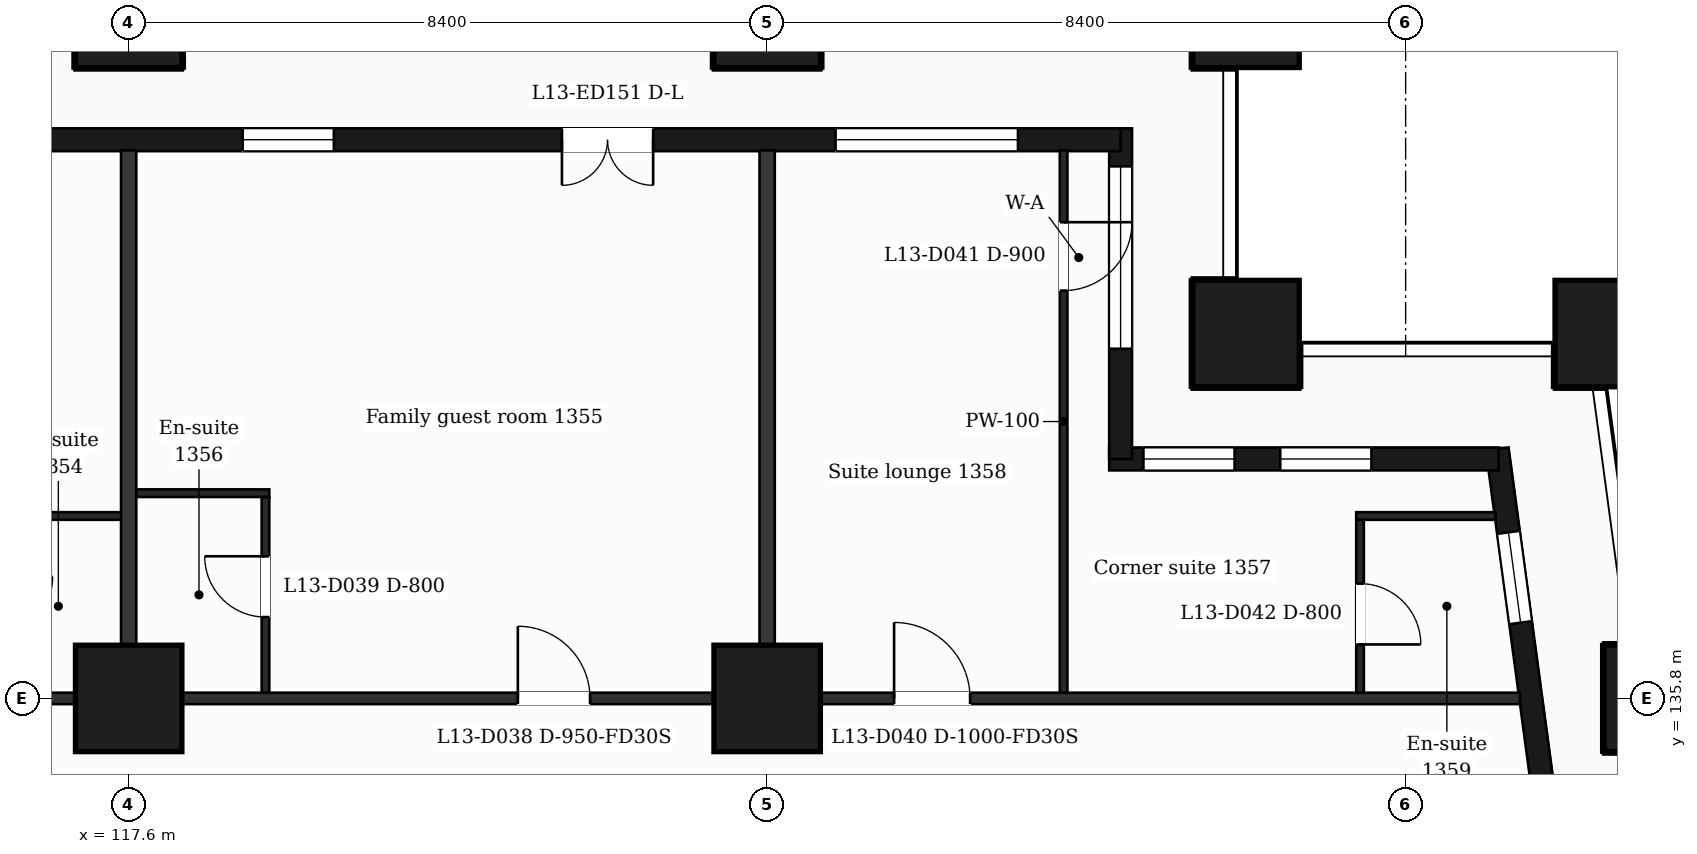
"""IFC4 building model, lengths in metres.
Left out: names, types, materials, properties, quantities, classifications, styles, units other than length and angle.
Written with IfcOpenShell. Run it as: python <this file> out.ifc"""

import sys

from ifc_helpers import new_model, si_unit, direction, frame, frame_2d, origin, origin_2d, place, context, subcontext, project, spatial, rectangle, extrude, element, fill, save


model = new_model("IFC4")
c1 = context("Model", 3, precision=1e-05, world=origin(), true_north=direction((0.0, 1.0)))
c2 = subcontext(c1, "Body", "Model", "MODEL_VIEW")
j1 = project(units=[si_unit("LENGTHUNIT", "METRE"), si_unit("PLANEANGLEUNIT", "RADIAN")], contexts=[c1])
p1 = place(None, origin())
s1 = spatial("IfcSite", under=j1, at=p1, CompositionType="ELEMENT")
p2 = place(p1, origin())
s2 = spatial("IfcBuilding", under=s1, at=p2, CompositionType="ELEMENT")
p3 = place(p2, frame((0.0, 0.0, 63.5)))
s3 = spatial("IfcBuildingStorey", under=s2, at=p3, CompositionType="ELEMENT", Elevation=63.5)
for number, where, z_axis, x_axis in (
    (1, (132.3, 140.6, 0.0), (0.0, 0.0, 1.0), (1.0, 0.0, 0.0)),
    (2, (137.065, 140.6, 0.0), (0.0, 0.0, 1.0), (1.0, 0.0, 0.0)),
    (3, (117.6, 135.8, 0.0), (0.0, 0.0, 1.0), (1.0, 0.0, 0.0)),
    (4, (126.0, 135.8, 0.0), (0.0, 0.0, 1.0), (1.0, 0.0, 0.0)),
    (5, (137.711, 135.8, 0.0), (0.0, 0.0, 1.0), (1.0, 0.0, 0.0)),
    (6, (117.6, 144.8, 0.0), (0.0, 0.0, 1.0), (1.0, 0.0, 0.0)),
    (7, (126.0, 144.8, 0.0), (0.0, 0.0, 1.0), (1.0, 0.0, 0.0)),
    (8, (132.3, 144.8, 0.0), (0.0, 0.0, 1.0), (1.0, 0.0, 0.0)),
):
    element("IfcColumn", number, at=place(p3, frame(where, z_axis=z_axis, x_axis=x_axis)), inside=s3, PredefinedType="COLUMN", context=c2, shape_type="SweptSolid", body=[
        extrude(rectangle(XDim=1.4, YDim=1.4, at=origin_2d()), origin(), (0.0, 0.0, 1.0), 3.5),
    ])
p4 = place(p3, frame((136.504, 132.4, 0.0), z_axis=(0.0, 0.0, 1.0), x_axis=(-0.133399697462, 0.99106231929, 0.0)))
e9 = element("IfcWall", 9, at=p4, inside=s3, PredefinedType="SOLIDWALL", context=c2, shape_type="SweptSolid", body=[
    extrude(rectangle(XDim=6.74, YDim=0.3, at=frame_2d((3.37, 0.0))), origin(), (0.0, 0.0, 1.0), 3.18),
])
p5 = place(p4, frame((1.115, 0.0, 0.0)))
e10 = element("IfcOpeningElement", 10, at=p5, cuts=e9, PredefinedType="OPENING", context=c2, shape_type="SweptSolid", body=[
    extrude(rectangle(XDim=1.2, YDim=2.4, at=frame_2d((0.6, 1.2))), frame((0.0, 0.16, 0.0), z_axis=(0.0, -1.0, 0.0), x_axis=(1.0, 0.0, 0.0)), (0.0, 0.0, 1.0), 0.32),
])
p6 = place(p4, frame((4.436, 0.0, 0.9)))
e11 = element("IfcOpeningElement", 11, at=p6, cuts=e9, PredefinedType="OPENING", context=c2, shape_type="SweptSolid", body=[
    extrude(rectangle(XDim=1.2, YDim=2.1, at=frame_2d((0.6, 1.05))), frame((0.0, 0.16, 0.0), z_axis=(0.0, -1.0, 0.0), x_axis=(1.0, 0.0, 0.0)), (0.0, 0.0, 1.0), 0.32),
])
p7 = place(p3, frame((135.623, 138.95, 0.0), z_axis=(0.0, 0.0, 1.0), x_axis=(-1.0, 0.0, 0.0)))
e12 = element("IfcWall", 12, at=p7, inside=s3, PredefinedType="SOLIDWALL", context=c2, shape_type="SweptSolid", body=[
    extrude(rectangle(XDim=5.123, YDim=0.3, at=frame_2d((2.561, 0.0))), origin(), (0.0, 0.0, 1.0), 3.18),
])
p8 = place(p7, frame((1.673, 0.0, 0.9)))
e13 = element("IfcOpeningElement", 13, at=p8, cuts=e12, PredefinedType="OPENING", context=c2, shape_type="SweptSolid", body=[
    extrude(rectangle(XDim=1.2, YDim=2.1, at=frame_2d((0.6, 1.05))), frame((0.0, 0.16, 0.0), z_axis=(0.0, -1.0, 0.0), x_axis=(1.0, 0.0, 0.0)), (0.0, 0.0, 1.0), 0.32),
])
p9 = place(p7, frame((3.473, 0.0, 0.9)))
e14 = element("IfcOpeningElement", 14, at=p9, cuts=e12, PredefinedType="OPENING", context=c2, shape_type="SweptSolid", body=[
    extrude(rectangle(XDim=1.2, YDim=2.1, at=frame_2d((0.6, 1.05))), frame((0.0, 0.16, 0.0), z_axis=(0.0, -1.0, 0.0), x_axis=(1.0, 0.0, 0.0)), (0.0, 0.0, 1.0), 0.32),
])
p10 = place(p3, frame((130.65, 138.95, 0.0), z_axis=(0.0, 0.0, 1.0), x_axis=(0.0, 1.0, 0.0)))
e15 = element("IfcWall", 15, at=p10, inside=s3, PredefinedType="SOLIDWALL", context=c2, shape_type="SweptSolid", body=[
    extrude(rectangle(XDim=4.35, YDim=0.3, at=frame_2d((2.175, 0.0))), origin(), (0.0, 0.0, 1.0), 3.18),
])
p11 = place(p10, frame((1.45, 0.0, 0.9)))
e16 = element("IfcOpeningElement", 16, at=p11, cuts=e15, PredefinedType="OPENING", context=c2, shape_type="SweptSolid", body=[
    extrude(rectangle(XDim=2.4, YDim=2.1, at=frame_2d((1.2, 1.05))), frame((0.0, 0.16, 0.0), z_axis=(0.0, -1.0, 0.0), x_axis=(1.0, 0.0, 0.0)), (0.0, 0.0, 1.0), 0.32),
])
p12 = place(p3, frame((130.65, 143.15, 0.0), z_axis=(0.0, 0.0, 1.0), x_axis=(-1.0, 0.0, 0.0)))
e17 = element("IfcWall", 17, at=p12, inside=s3, PredefinedType="SOLIDWALL", context=c2, shape_type="SweptSolid", body=[
    extrude(rectangle(XDim=14.25, YDim=0.3, at=frame_2d((7.125, 0.0))), origin(), (0.0, 0.0, 1.0), 3.18),
])
p13 = place(p12, frame((1.35, 0.0, 0.9)))
e18 = element("IfcOpeningElement", 18, at=p13, cuts=e17, PredefinedType="OPENING", context=c2, shape_type="SweptSolid", body=[
    extrude(rectangle(XDim=2.4, YDim=2.1, at=frame_2d((1.2, 1.05))), frame((0.0, 0.16, 0.0), z_axis=(0.0, -1.0, 0.0), x_axis=(1.0, 0.0, 0.0)), (0.0, 0.0, 1.0), 0.32),
])
p14 = place(p12, frame((6.15, 0.0, 0.0)))
e19 = element("IfcOpeningElement", 19, at=p14, cuts=e17, PredefinedType="OPENING", context=c2, shape_type="SweptSolid", body=[
    extrude(rectangle(XDim=1.2, YDim=2.4, at=frame_2d((0.6, 1.2))), frame((0.0, 0.16, 0.0), z_axis=(0.0, -1.0, 0.0), x_axis=(1.0, 0.0, 0.0)), (0.0, 0.0, 1.0), 0.32),
])
p15 = place(p12, frame((10.35, 0.0, 0.9)))
e20 = element("IfcOpeningElement", 20, at=p15, cuts=e17, PredefinedType="OPENING", context=c2, shape_type="SweptSolid", body=[
    extrude(rectangle(XDim=1.2, YDim=2.1, at=frame_2d((0.6, 1.05))), frame((0.0, 0.16, 0.0), z_axis=(0.0, -1.0, 0.0), x_axis=(1.0, 0.0, 0.0)), (0.0, 0.0, 1.0), 0.32),
])
p16 = place(p3, frame((90.895, 135.8, 0.0), z_axis=(0.0, 0.0, 1.0), x_axis=(1.0, 0.0, 0.0)))
e21 = element("IfcWall", 21, at=p16, inside=s3, PredefinedType="PARTITIONING", context=c2, shape_type="SweptSolid", body=[
    extrude(rectangle(XDim=45.011, YDim=0.15, at=frame_2d((22.505, 0.0))), origin(), (0.0, 0.0, 1.0), 3.18),
])
p17 = place(p16, frame((7.675, 0.0, 0.0)))
e22 = element("IfcOpeningElement", 22, at=p17, cuts=e21, PredefinedType="OPENING", context=c2, shape_type="SweptSolid", body=[
    extrude(rectangle(XDim=1.0, YDim=2.1, at=frame_2d((0.5, 1.05))), frame((0.0, 0.085, 0.0), z_axis=(0.0, -1.0, 0.0), x_axis=(1.0, 0.0, 0.0)), (0.0, 0.0, 1.0), 0.17),
])
p18 = place(p16, frame((10.892, 0.0, 0.0)))
e23 = element("IfcOpeningElement", 23, at=p18, cuts=e21, PredefinedType="OPENING", context=c2, shape_type="SweptSolid", body=[
    extrude(rectangle(XDim=0.95, YDim=2.1, at=frame_2d((0.475, 1.05))), frame((0.0, 0.085, 0.0), z_axis=(0.0, -1.0, 0.0), x_axis=(1.0, 0.0, 0.0)), (0.0, 0.0, 1.0), 0.17),
])
p19 = place(p16, frame((16.442, 0.0, 0.0)))
e24 = element("IfcOpeningElement", 24, at=p19, cuts=e21, PredefinedType="OPENING", context=c2, shape_type="SweptSolid", body=[
    extrude(rectangle(XDim=0.95, YDim=2.1, at=frame_2d((0.475, 1.05))), frame((0.0, 0.085, 0.0), z_axis=(0.0, -1.0, 0.0), x_axis=(1.0, 0.0, 0.0)), (0.0, 0.0, 1.0), 0.17),
])
p20 = place(p16, frame((22.368, 0.0, 0.0)))
e25 = element("IfcOpeningElement", 25, at=p20, cuts=e21, PredefinedType="OPENING", context=c2, shape_type="SweptSolid", body=[
    extrude(rectangle(XDim=0.95, YDim=2.1, at=frame_2d((0.475, 1.05))), frame((0.0, 0.085, 0.0), z_axis=(0.0, -1.0, 0.0), x_axis=(1.0, 0.0, 0.0)), (0.0, 0.0, 1.0), 0.17),
])
p21 = place(p16, frame((31.825, 0.0, 0.0)))
e26 = element("IfcOpeningElement", 26, at=p21, cuts=e21, PredefinedType="OPENING", context=c2, shape_type="SweptSolid", body=[
    extrude(rectangle(XDim=0.95, YDim=2.1, at=frame_2d((0.475, 1.05))), frame((0.0, 0.085, 0.0), z_axis=(0.0, -1.0, 0.0), x_axis=(1.0, 0.0, 0.0)), (0.0, 0.0, 1.0), 0.17),
])
p22 = place(p16, frame((36.775, 0.0, 0.0)))
e27 = element("IfcOpeningElement", 27, at=p22, cuts=e21, PredefinedType="OPENING", context=c2, shape_type="SweptSolid", body=[
    extrude(rectangle(XDim=1.0, YDim=2.1, at=frame_2d((0.5, 1.05))), frame((0.0, 0.085, 0.0), z_axis=(0.0, -1.0, 0.0), x_axis=(1.0, 0.0, 0.0)), (0.0, 0.0, 1.0), 0.17),
])
p23 = place(p3, frame((115.75, 138.2, 0.0), z_axis=(0.0, 0.0, 1.0), x_axis=(1.0, 0.0, 0.0)))
e28 = element("IfcWall", 28, at=p23, inside=s3, PredefinedType="PARTITIONING", context=c2, shape_type="SweptSolid", body=[
    extrude(rectangle(XDim=1.85, YDim=0.1, at=frame_2d((0.925, 0.0))), origin(), (0.0, 0.0, 1.0), 3.18),
])
p24 = place(p3, frame((133.75, 138.2, 0.0), z_axis=(0.0, 0.0, 1.0), x_axis=(1.0, 0.0, 0.0)))
e29 = element("IfcWall", 29, at=p24, inside=s3, PredefinedType="PARTITIONING", context=c2, shape_type="SweptSolid", body=[
    extrude(rectangle(XDim=1.832, YDim=0.1, at=frame_2d((0.916, 0.0))), origin(), (0.0, 0.0, 1.0), 3.18),
])
p25 = place(p3, frame((117.6, 138.5, 0.0), z_axis=(0.0, 0.0, 1.0), x_axis=(1.0, 0.0, 0.0)))
e30 = element("IfcWall", 30, at=p25, inside=s3, PredefinedType="PARTITIONING", context=c2, shape_type="SweptSolid", body=[
    extrude(rectangle(XDim=1.85, YDim=0.1, at=frame_2d((0.925, 0.0))), origin(), (0.0, 0.0, 1.0), 3.18),
])
p26 = place(p3, frame((117.6, 135.875, 0.0), z_axis=(0.0, 0.0, 1.0), x_axis=(0.0, 1.0, 0.0)))
e31 = element("IfcWall", 31, at=p26, inside=s3, PredefinedType="PARTITIONING", context=c2, shape_type="SweptSolid", body=[
    extrude(rectangle(XDim=7.135, YDim=0.2, at=frame_2d((3.567, 0.0))), origin(), (0.0, 0.0, 1.0), 3.18),
])
p27 = place(p3, frame((119.4, 135.875, 0.0), z_axis=(0.0, 0.0, 1.0), x_axis=(0.0, 1.0, 0.0)))
e32 = element("IfcWall", 32, at=p27, inside=s3, PredefinedType="PARTITIONING", context=c2, shape_type="SweptSolid", body=[
    extrude(rectangle(XDim=2.575, YDim=0.1, at=frame_2d((1.288, 0.0))), origin(), (0.0, 0.0, 1.0), 3.18),
])
p28 = place(p27, frame((0.995, 0.0, 0.0)))
e33 = element("IfcOpeningElement", 33, at=p28, cuts=e32, PredefinedType="OPENING", context=c2, shape_type="SweptSolid", body=[
    extrude(rectangle(XDim=0.8, YDim=2.1, at=frame_2d((0.4, 1.05))), frame((0.0, 0.06, 0.0), z_axis=(0.0, -1.0, 0.0), x_axis=(1.0, 0.0, 0.0)), (0.0, 0.0, 1.0), 0.12),
])
p29 = place(p3, frame((126.0, 135.875, 0.0), z_axis=(0.0, 0.0, 1.0), x_axis=(0.0, 1.0, 0.0)))
e34 = element("IfcWall", 34, at=p29, inside=s3, PredefinedType="PARTITIONING", context=c2, shape_type="SweptSolid", body=[
    extrude(rectangle(XDim=7.135, YDim=0.2, at=frame_2d((3.567, 0.0))), origin(), (0.0, 0.0, 1.0), 3.18),
])
p30 = place(p3, frame((129.9, 135.875, 0.0), z_axis=(0.0, 0.0, 1.0), x_axis=(0.0, 1.0, 0.0)))
e35 = element("IfcWall", 35, at=p30, inside=s3, PredefinedType="PARTITIONING", context=c2, shape_type="SweptSolid", body=[
    extrude(rectangle(XDim=7.135, YDim=0.1, at=frame_2d((3.567, 0.0))), origin(), (0.0, 0.0, 1.0), 3.18),
])
p31 = place(p30, frame((5.29, 0.0, 0.0)))
e36 = element("IfcOpeningElement", 36, at=p31, cuts=e35, PredefinedType="OPENING", context=c2, shape_type="SweptSolid", body=[
    extrude(rectangle(XDim=0.9, YDim=2.1, at=frame_2d((0.45, 1.05))), frame((0.0, 0.06, 0.0), z_axis=(0.0, -1.0, 0.0), x_axis=(1.0, 0.0, 0.0)), (0.0, 0.0, 1.0), 0.12),
])
p32 = place(p3, frame((133.8, 135.875, 0.0), z_axis=(0.0, 0.0, 1.0), x_axis=(0.0, 1.0, 0.0)))
e37 = element("IfcWall", 37, at=p32, inside=s3, PredefinedType="PARTITIONING", context=c2, shape_type="SweptSolid", body=[
    extrude(rectangle(XDim=2.275, YDim=0.1, at=frame_2d((1.137, 0.0))), origin(), (0.0, 0.0, 1.0), 3.18),
])
p33 = place(p32, frame((0.635, 0.0, 0.0)))
e38 = element("IfcOpeningElement", 38, at=p33, cuts=e37, PredefinedType="OPENING", context=c2, shape_type="SweptSolid", body=[
    extrude(rectangle(XDim=0.8, YDim=2.1, at=frame_2d((0.4, 1.05))), frame((0.0, 0.06, 0.0), z_axis=(0.0, -1.0, 0.0), x_axis=(1.0, 0.0, 0.0)), (0.0, 0.0, 1.0), 0.12),
])
p34 = place(p6, origin())
e39 = element("IfcWindow", 39, at=p34, inside=s3, PartitioningType="SINGLE_PANEL", PredefinedType="WINDOW", context=c2, shape_type="SweptSolid", body=[
    extrude(rectangle(XDim=1.2, YDim=2.1, at=frame_2d((0.6, 1.05))), frame((0.0, 0.03, 0.0), z_axis=(0.0, -1.0, 0.0), x_axis=(1.0, 0.0, 0.0)), (0.0, 0.0, 1.0), 0.06),
])
fill(e11, e39)
p35 = place(p8, origin())
e40 = element("IfcWindow", 40, at=p35, inside=s3, PartitioningType="SINGLE_PANEL", PredefinedType="WINDOW", context=c2, shape_type="SweptSolid", body=[
    extrude(rectangle(XDim=1.2, YDim=2.1, at=frame_2d((0.6, 1.05))), frame((0.0, 0.03, 0.0), z_axis=(0.0, -1.0, 0.0), x_axis=(1.0, 0.0, 0.0)), (0.0, 0.0, 1.0), 0.06),
])
fill(e13, e40)
p36 = place(p9, origin())
e41 = element("IfcWindow", 41, at=p36, inside=s3, PartitioningType="SINGLE_PANEL", PredefinedType="WINDOW", context=c2, shape_type="SweptSolid", body=[
    extrude(rectangle(XDim=1.2, YDim=2.1, at=frame_2d((0.6, 1.05))), frame((0.0, 0.03, 0.0), z_axis=(0.0, -1.0, 0.0), x_axis=(1.0, 0.0, 0.0)), (0.0, 0.0, 1.0), 0.06),
])
fill(e14, e41)
p37 = place(p11, origin())
e42 = element("IfcWindow", 42, at=p37, inside=s3, PartitioningType="SINGLE_PANEL", PredefinedType="WINDOW", context=c2, shape_type="SweptSolid", body=[
    extrude(rectangle(XDim=2.4, YDim=2.1, at=frame_2d((1.2, 1.05))), frame((0.0, 0.03, 0.0), z_axis=(0.0, -1.0, 0.0), x_axis=(1.0, 0.0, 0.0)), (0.0, 0.0, 1.0), 0.06),
])
fill(e16, e42)
p38 = place(p13, origin())
e43 = element("IfcWindow", 43, at=p38, inside=s3, PartitioningType="SINGLE_PANEL", PredefinedType="WINDOW", context=c2, shape_type="SweptSolid", body=[
    extrude(rectangle(XDim=2.4, YDim=2.1, at=frame_2d((1.2, 1.05))), frame((0.0, 0.03, 0.0), z_axis=(0.0, -1.0, 0.0), x_axis=(1.0, 0.0, 0.0)), (0.0, 0.0, 1.0), 0.06),
])
fill(e18, e43)
p39 = place(p14, origin())
e44 = element("IfcDoor", 44, at=p39, inside=s3, OperationType="DOUBLE_DOOR_SINGLE_SWING", PredefinedType="DOOR", context=c2, shape_type="SweptSolid", body=[
    extrude(rectangle(XDim=1.2, YDim=2.4, at=frame_2d((0.6, 1.2))), frame((0.0, 0.025, 0.0), z_axis=(0.0, -1.0, 0.0), x_axis=(1.0, 0.0, 0.0)), (0.0, 0.0, 1.0), 0.05),
])
fill(e19, e44)
p40 = place(p15, origin())
e45 = element("IfcWindow", 45, at=p40, inside=s3, PartitioningType="SINGLE_PANEL", PredefinedType="WINDOW", context=c2, shape_type="SweptSolid", body=[
    extrude(rectangle(XDim=1.2, YDim=2.1, at=frame_2d((0.6, 1.05))), frame((0.0, 0.03, 0.0), z_axis=(0.0, -1.0, 0.0), x_axis=(1.0, 0.0, 0.0)), (0.0, 0.0, 1.0), 0.06),
])
fill(e20, e45)
p41 = place(p21, origin())
e46 = element("IfcDoor", 46, at=p41, inside=s3, OperationType="SINGLE_SWING_LEFT", PredefinedType="DOOR", context=c2, shape_type="SweptSolid", body=[
    extrude(rectangle(XDim=0.95, YDim=2.1, at=frame_2d((0.475, 1.05))), frame((0.0, 0.025, 0.0), z_axis=(0.0, -1.0, 0.0), x_axis=(1.0, 0.0, 0.0)), (0.0, 0.0, 1.0), 0.05),
])
fill(e26, e46)
p42 = place(p28, origin())
e47 = element("IfcDoor", 47, at=p42, inside=s3, OperationType="SINGLE_SWING_RIGHT", PredefinedType="DOOR", context=c2, shape_type="SweptSolid", body=[
    extrude(rectangle(XDim=0.8, YDim=2.1, at=frame_2d((0.4, 1.05))), frame((0.0, 0.025, 0.0), z_axis=(0.0, -1.0, 0.0), x_axis=(1.0, 0.0, 0.0)), (0.0, 0.0, 1.0), 0.05),
])
fill(e33, e47)
p43 = place(p22, origin())
e48 = element("IfcDoor", 48, at=p43, inside=s3, OperationType="SINGLE_SWING_LEFT", PredefinedType="DOOR", context=c2, shape_type="SweptSolid", body=[
    extrude(rectangle(XDim=1.0, YDim=2.1, at=frame_2d((0.5, 1.05))), frame((0.0, 0.025, 0.0), z_axis=(0.0, -1.0, 0.0), x_axis=(1.0, 0.0, 0.0)), (0.0, 0.0, 1.0), 0.05),
])
fill(e27, e48)
p44 = place(p31, origin())
e49 = element("IfcDoor", 49, at=p44, inside=s3, OperationType="SINGLE_SWING_RIGHT", PredefinedType="DOOR", context=c2, shape_type="SweptSolid", body=[
    extrude(rectangle(XDim=0.9, YDim=2.1, at=frame_2d((0.45, 1.05))), frame((0.0, 0.025, 0.0), z_axis=(0.0, -1.0, 0.0), x_axis=(1.0, 0.0, 0.0)), (0.0, 0.0, 1.0), 0.05),
])
fill(e36, e49)
p45 = place(p33, origin())
e50 = element("IfcDoor", 50, at=p45, inside=s3, OperationType="SINGLE_SWING_LEFT", PredefinedType="DOOR", context=c2, shape_type="SweptSolid", body=[
    extrude(rectangle(XDim=0.8, YDim=2.1, at=frame_2d((0.4, 1.05))), frame((0.0, 0.025, 0.0), z_axis=(0.0, -1.0, 0.0), x_axis=(1.0, 0.0, 0.0)), (0.0, 0.0, 1.0), 0.05),
])
fill(e38, e50)
save(model, sys.argv[1])
